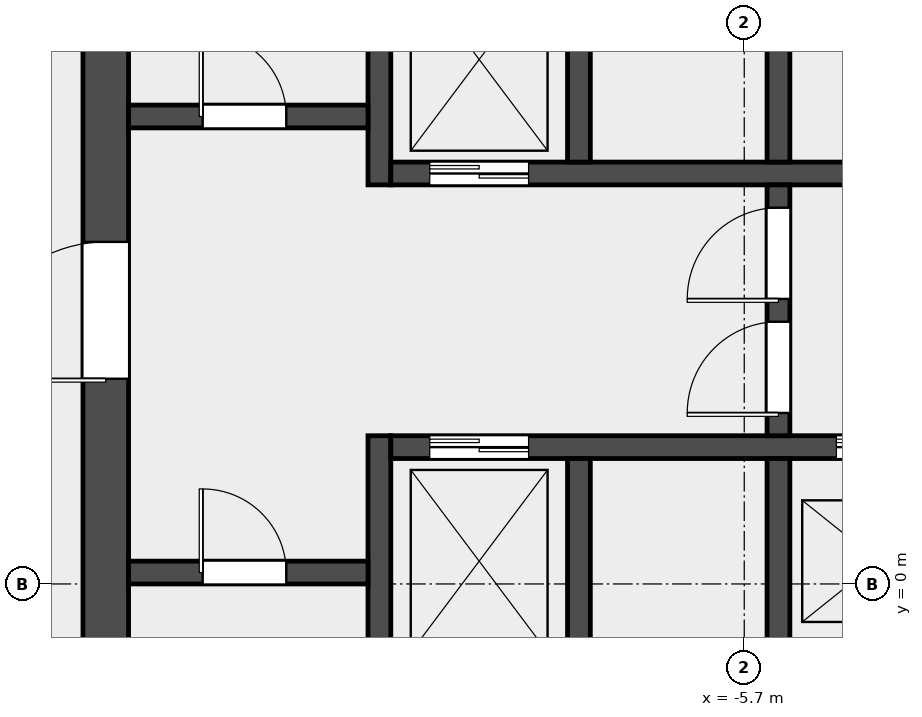
"""IFC4 building model, lengths in metres.
Left out: names, types, materials, properties, quantities, classifications, styles, units other than length and angle.
Written with IfcOpenShell. Run it as: python <this file> out.ifc"""

import sys

from ifc_helpers import new_model, si_unit, direction, frame, frame_2d, origin, place, context, subcontext, project, spatial, rectangle, extrude, element, fill, save


model = new_model("IFC4")
c1 = context("Model", 3, precision=1e-05, world=origin(), true_north=direction((0.0, 1.0)))
c2 = subcontext(c1, "Body", "Model", "MODEL_VIEW")
j1 = project(units=[si_unit("LENGTHUNIT", "METRE"), si_unit("PLANEANGLEUNIT", "RADIAN")], contexts=[c1])
p1 = place(None, origin())
s1 = spatial("IfcSite", under=j1, at=p1, CompositionType="ELEMENT")
p2 = place(p1, origin())
s2 = spatial("IfcBuilding", under=s1, at=p2, CompositionType="ELEMENT")
p3 = place(p2, frame((0.0, 0.0, 177.0)))
s3 = spatial("IfcBuildingStorey", under=s2, at=p3, CompositionType="ELEMENT", Elevation=177.0)
p4 = place(p3, frame((-14.1, -6.6, 0.0), z_axis=(0.0, 0.0, 1.0), x_axis=(0.0, 1.0, 0.0)))
e1 = element("IfcWall", 1, at=p4, inside=s3, PredefinedType="SHEAR", context=c2, shape_type="SweptSolid", body=[
    extrude(rectangle(XDim=19.5, YDim=0.6, at=frame_2d((9.75, 0.0))), origin(), (0.0, 0.0, 1.0), 3.7),
])
p5 = place(p4, frame((9.3, 0.0, 0.0)))
e2 = element("IfcOpeningElement", 2, at=p5, cuts=e1, PredefinedType="OPENING", context=c2, shape_type="SweptSolid", body=[
    extrude(rectangle(XDim=1.8, YDim=2.1, at=frame_2d((0.9, 1.05))), frame((0.0, 0.312, 0.0), z_axis=(0.0, -1.0, 0.0), x_axis=(1.0, 0.0, 0.0)), (0.0, 0.0, 1.0), 0.624),
])
p6 = place(p3, frame((-10.5, -6.6, 0.0), z_axis=(0.0, 0.0, 1.0), x_axis=(0.0, 1.0, 0.0)))
e3 = element("IfcWall", 3, at=p6, inside=s3, PredefinedType="SHEAR", context=c2, shape_type="SweptSolid", body=[
    extrude(rectangle(XDim=8.55, YDim=0.3, at=frame_2d((4.275, 0.0))), origin(), (0.0, 0.0, 1.0), 3.7),
])
p7 = place(p3, frame((-10.5, 5.25, 0.0), z_axis=(0.0, 0.0, 1.0), x_axis=(0.0, 1.0, 0.0)))
e4 = element("IfcWall", 4, at=p7, inside=s3, PredefinedType="SHEAR", context=c2, shape_type="SweptSolid", body=[
    extrude(rectangle(XDim=7.65, YDim=0.3, at=frame_2d((3.825, 0.0))), origin(), (0.0, 0.0, 1.0), 3.7),
])
p8 = place(p3, frame((-13.8, 0.15, 0.0), z_axis=(0.0, 0.0, 1.0), x_axis=(1.0, 0.0, 0.0)))
e5 = element("IfcWall", 5, at=p8, inside=s3, PredefinedType="SOLIDWALL", context=c2, shape_type="SweptSolid", body=[
    extrude(rectangle(XDim=3.15, YDim=0.3, at=frame_2d((1.575, 0.0))), origin(), (0.0, 0.0, 1.0), 3.7),
])
p9 = place(p8, frame((0.975, 0.0, 0.0)))
e6 = element("IfcOpeningElement", 6, at=p9, cuts=e5, PredefinedType="OPENING", context=c2, shape_type="SweptSolid", body=[
    extrude(rectangle(XDim=1.1, YDim=2.1, at=frame_2d((0.55, 1.05))), frame((0.0, 0.162, 0.0), z_axis=(0.0, -1.0, 0.0), x_axis=(1.0, 0.0, 0.0)), (0.0, 0.0, 1.0), 0.324),
])
p10 = place(p3, frame((-13.8, 6.15, 0.0), z_axis=(0.0, 0.0, 1.0), x_axis=(1.0, 0.0, 0.0)))
e7 = element("IfcWall", 7, at=p10, inside=s3, PredefinedType="SOLIDWALL", context=c2, shape_type="SweptSolid", body=[
    extrude(rectangle(XDim=3.15, YDim=0.3, at=frame_2d((1.575, 0.0))), origin(), (0.0, 0.0, 1.0), 3.7),
])
p11 = place(p10, frame((0.975, 0.0, 0.0)))
e8 = element("IfcOpeningElement", 8, at=p11, cuts=e7, PredefinedType="OPENING", context=c2, shape_type="SweptSolid", body=[
    extrude(rectangle(XDim=1.1, YDim=2.1, at=frame_2d((0.55, 1.05))), frame((0.0, 0.162, 0.0), z_axis=(0.0, -1.0, 0.0), x_axis=(1.0, 0.0, 0.0)), (0.0, 0.0, 1.0), 0.324),
])
p12 = place(p3, frame((-10.35, 1.8, 0.0), z_axis=(0.0, 0.0, 1.0), x_axis=(1.0, 0.0, 0.0)))
e9 = element("IfcWall", 9, at=p12, inside=s3, PredefinedType="SOLIDWALL", context=c2, shape_type="SweptSolid", body=[
    extrude(rectangle(XDim=20.7, YDim=0.3, at=frame_2d((10.35, 0.0))), origin(), (0.0, 0.0, 1.0), 3.7),
])
p13 = place(p12, frame((0.512, 0.0, 0.0)))
e10 = element("IfcOpeningElement", 10, at=p13, cuts=e9, PredefinedType="OPENING", context=c2, shape_type="SweptSolid", body=[
    extrude(rectangle(XDim=1.3, YDim=2.1, at=frame_2d((0.65, 1.05))), frame((0.0, 0.162, 0.0), z_axis=(0.0, -1.0, 0.0), x_axis=(1.0, 0.0, 0.0)), (0.0, 0.0, 1.0), 0.324),
])
p14 = place(p12, frame((5.863, 0.0, 0.0)))
e11 = element("IfcOpeningElement", 11, at=p14, cuts=e9, PredefinedType="OPENING", context=c2, shape_type="SweptSolid", body=[
    extrude(rectangle(XDim=1.1, YDim=2.1, at=frame_2d((0.55, 1.05))), frame((0.0, 0.162, 0.0), z_axis=(0.0, -1.0, 0.0), x_axis=(1.0, 0.0, 0.0)), (0.0, 0.0, 1.0), 0.324),
])
p15 = place(p12, frame((8.488, 0.0, 0.0)))
e12 = element("IfcOpeningElement", 12, at=p15, cuts=e9, PredefinedType="OPENING", context=c2, shape_type="SweptSolid", body=[
    extrude(rectangle(XDim=1.1, YDim=2.1, at=frame_2d((0.55, 1.05))), frame((0.0, 0.162, 0.0), z_axis=(0.0, -1.0, 0.0), x_axis=(1.0, 0.0, 0.0)), (0.0, 0.0, 1.0), 0.324),
])
p16 = place(p12, frame((11.113, 0.0, 0.0)))
e13 = element("IfcOpeningElement", 13, at=p16, cuts=e9, PredefinedType="OPENING", context=c2, shape_type="SweptSolid", body=[
    extrude(rectangle(XDim=1.1, YDim=2.1, at=frame_2d((0.55, 1.05))), frame((0.0, 0.162, 0.0), z_axis=(0.0, -1.0, 0.0), x_axis=(1.0, 0.0, 0.0)), (0.0, 0.0, 1.0), 0.324),
])
p17 = place(p12, frame((13.738, 0.0, 0.0)))
e14 = element("IfcOpeningElement", 14, at=p17, cuts=e9, PredefinedType="OPENING", context=c2, shape_type="SweptSolid", body=[
    extrude(rectangle(XDim=1.1, YDim=2.1, at=frame_2d((0.55, 1.05))), frame((0.0, 0.162, 0.0), z_axis=(0.0, -1.0, 0.0), x_axis=(1.0, 0.0, 0.0)), (0.0, 0.0, 1.0), 0.324),
])
p18 = place(p12, frame((16.363, 0.0, 0.0)))
e15 = element("IfcOpeningElement", 15, at=p18, cuts=e9, PredefinedType="OPENING", context=c2, shape_type="SweptSolid", body=[
    extrude(rectangle(XDim=1.1, YDim=2.1, at=frame_2d((0.55, 1.05))), frame((0.0, 0.162, 0.0), z_axis=(0.0, -1.0, 0.0), x_axis=(1.0, 0.0, 0.0)), (0.0, 0.0, 1.0), 0.324),
])
p19 = place(p12, frame((18.988, 0.0, 0.0)))
e16 = element("IfcOpeningElement", 16, at=p19, cuts=e9, PredefinedType="OPENING", context=c2, shape_type="SweptSolid", body=[
    extrude(rectangle(XDim=1.1, YDim=2.1, at=frame_2d((0.55, 1.05))), frame((0.0, 0.162, 0.0), z_axis=(0.0, -1.0, 0.0), x_axis=(1.0, 0.0, 0.0)), (0.0, 0.0, 1.0), 0.324),
])
p20 = place(p3, frame((-10.35, 5.4, 0.0), z_axis=(0.0, 0.0, 1.0), x_axis=(1.0, 0.0, 0.0)))
e17 = element("IfcWall", 17, at=p20, inside=s3, PredefinedType="SOLIDWALL", context=c2, shape_type="SweptSolid", body=[
    extrude(rectangle(XDim=20.7, YDim=0.3, at=frame_2d((10.35, 0.0))), origin(), (0.0, 0.0, 1.0), 3.7),
])
p21 = place(p20, frame((0.512, 0.0, 0.0)))
e18 = element("IfcOpeningElement", 18, at=p21, cuts=e17, PredefinedType="OPENING", context=c2, shape_type="SweptSolid", body=[
    extrude(rectangle(XDim=1.3, YDim=2.1, at=frame_2d((0.65, 1.05))), frame((0.0, 0.162, 0.0), z_axis=(0.0, -1.0, 0.0), x_axis=(1.0, 0.0, 0.0)), (0.0, 0.0, 1.0), 0.324),
])
for number, where, z_axis, x_axis in (
    (19, (-7.875, -1.05, 0.0), (0.0, 0.0, 1.0), (0.0, 1.0, 0.0)),
    (20, (-5.25, -1.05, 0.0), (0.0, 0.0, 1.0), (0.0, 1.0, 0.0)),
    (21, (-7.875, 5.55, 0.0), (0.0, 0.0, 1.0), (0.0, 1.0, 0.0)),
    (22, (-5.25, 5.55, 0.0), (0.0, 0.0, 1.0), (0.0, 1.0, 0.0)),
):
    element("IfcWall", number, at=place(p3, frame(where, z_axis=z_axis, x_axis=x_axis)), inside=s3, PredefinedType="SOLIDWALL", context=c2, shape_type="SweptSolid", body=[
        extrude(rectangle(XDim=2.7, YDim=0.3, at=frame_2d((1.35, 0.0))), origin(), (0.0, 0.0, 1.0), 3.7),
    ])
p22 = place(p3, frame((-5.25, 1.95, 0.0), z_axis=(0.0, 0.0, 1.0), x_axis=(0.0, 1.0, 0.0)))
e23 = element("IfcWall", 23, at=p22, inside=s3, PredefinedType="SOLIDWALL", context=c2, shape_type="SweptSolid", body=[
    extrude(rectangle(XDim=3.3, YDim=0.3, at=frame_2d((1.65, 0.0))), origin(), (0.0, 0.0, 1.0), 3.7),
])
p23 = place(p22, frame((0.3, 0.0, 0.0)))
e24 = element("IfcOpeningElement", 24, at=p23, cuts=e23, PredefinedType="OPENING", context=c2, shape_type="SweptSolid", body=[
    extrude(rectangle(XDim=1.2, YDim=2.1, at=frame_2d((0.6, 1.05))), frame((0.0, 0.162, 0.0), z_axis=(0.0, -1.0, 0.0), x_axis=(1.0, 0.0, 0.0)), (0.0, 0.0, 1.0), 0.324),
])
p24 = place(p22, frame((1.8, 0.0, 0.0)))
e25 = element("IfcOpeningElement", 25, at=p24, cuts=e23, PredefinedType="OPENING", context=c2, shape_type="SweptSolid", body=[
    extrude(rectangle(XDim=1.2, YDim=2.1, at=frame_2d((0.6, 1.05))), frame((0.0, 0.162, 0.0), z_axis=(0.0, -1.0, 0.0), x_axis=(1.0, 0.0, 0.0)), (0.0, 0.0, 1.0), 0.324),
])
p25 = place(p9, origin())
e26 = element("IfcDoor", 26, at=p25, inside=s3, OperationType="SINGLE_SWING_LEFT", PredefinedType="DOOR", context=c2, shape_type="SweptSolid", body=[
    extrude(rectangle(XDim=1.1, YDim=2.1, at=frame_2d((0.55, 1.05))), frame((0.0, 0.025, 0.0), z_axis=(0.0, -1.0, 0.0), x_axis=(1.0, 0.0, 0.0)), (0.0, 0.0, 1.0), 0.05),
])
fill(e6, e26)
p26 = place(p11, origin())
e27 = element("IfcDoor", 27, at=p26, inside=s3, OperationType="SINGLE_SWING_LEFT", PredefinedType="DOOR", context=c2, shape_type="SweptSolid", body=[
    extrude(rectangle(XDim=1.1, YDim=2.1, at=frame_2d((0.55, 1.05))), frame((0.0, 0.025, 0.0), z_axis=(0.0, -1.0, 0.0), x_axis=(1.0, 0.0, 0.0)), (0.0, 0.0, 1.0), 0.05),
])
fill(e8, e27)
p27 = place(p5, origin())
e28 = element("IfcDoor", 28, at=p27, inside=s3, OperationType="DOUBLE_DOOR_SINGLE_SWING", PredefinedType="DOOR", context=c2, shape_type="SweptSolid", body=[
    extrude(rectangle(XDim=1.8, YDim=2.1, at=frame_2d((0.9, 1.05))), frame((0.0, 0.025, 0.0), z_axis=(0.0, -1.0, 0.0), x_axis=(1.0, 0.0, 0.0)), (0.0, 0.0, 1.0), 0.05),
])
fill(e2, e28)
p28 = place(p23, origin())
e29 = element("IfcDoor", 29, at=p28, inside=s3, OperationType="SINGLE_SWING_LEFT", PredefinedType="DOOR", context=c2, shape_type="SweptSolid", body=[
    extrude(rectangle(XDim=1.2, YDim=2.1, at=frame_2d((0.6, 1.05))), frame((0.0, 0.025, 0.0), z_axis=(0.0, -1.0, 0.0), x_axis=(1.0, 0.0, 0.0)), (0.0, 0.0, 1.0), 0.05),
])
fill(e24, e29)
p29 = place(p24, origin())
e30 = element("IfcDoor", 30, at=p29, inside=s3, OperationType="SINGLE_SWING_RIGHT", PredefinedType="DOOR", context=c2, shape_type="SweptSolid", body=[
    extrude(rectangle(XDim=1.2, YDim=2.1, at=frame_2d((0.6, 1.05))), frame((0.0, 0.025, 0.0), z_axis=(0.0, -1.0, 0.0), x_axis=(1.0, 0.0, 0.0)), (0.0, 0.0, 1.0), 0.05),
])
fill(e25, e30)
p30 = place(p13, origin())
e31 = element("IfcDoor", 31, at=p30, inside=s3, OperationType="DOUBLE_DOOR_SLIDING", PredefinedType="DOOR", context=c2, shape_type="SweptSolid", body=[
    extrude(rectangle(XDim=1.3, YDim=2.1, at=frame_2d((0.65, 1.05))), frame((0.0, 0.025, 0.0), z_axis=(0.0, -1.0, 0.0), x_axis=(1.0, 0.0, 0.0)), (0.0, 0.0, 1.0), 0.05),
])
fill(e10, e31)
p31 = place(p14, origin())
e32 = element("IfcDoor", 32, at=p31, inside=s3, OperationType="DOUBLE_DOOR_SLIDING", PredefinedType="DOOR", context=c2, shape_type="SweptSolid", body=[
    extrude(rectangle(XDim=1.1, YDim=2.1, at=frame_2d((0.55, 1.05))), frame((0.0, 0.025, 0.0), z_axis=(0.0, -1.0, 0.0), x_axis=(1.0, 0.0, 0.0)), (0.0, 0.0, 1.0), 0.05),
])
fill(e11, e32)
p32 = place(p21, origin())
e33 = element("IfcDoor", 33, at=p32, inside=s3, OperationType="DOUBLE_DOOR_SLIDING", PredefinedType="DOOR", context=c2, shape_type="SweptSolid", body=[
    extrude(rectangle(XDim=1.3, YDim=2.1, at=frame_2d((0.65, 1.05))), frame((0.0, 0.025, 0.0), z_axis=(0.0, -1.0, 0.0), x_axis=(1.0, 0.0, 0.0)), (0.0, 0.0, 1.0), 0.05),
])
fill(e18, e33)
save(model, sys.argv[1])
